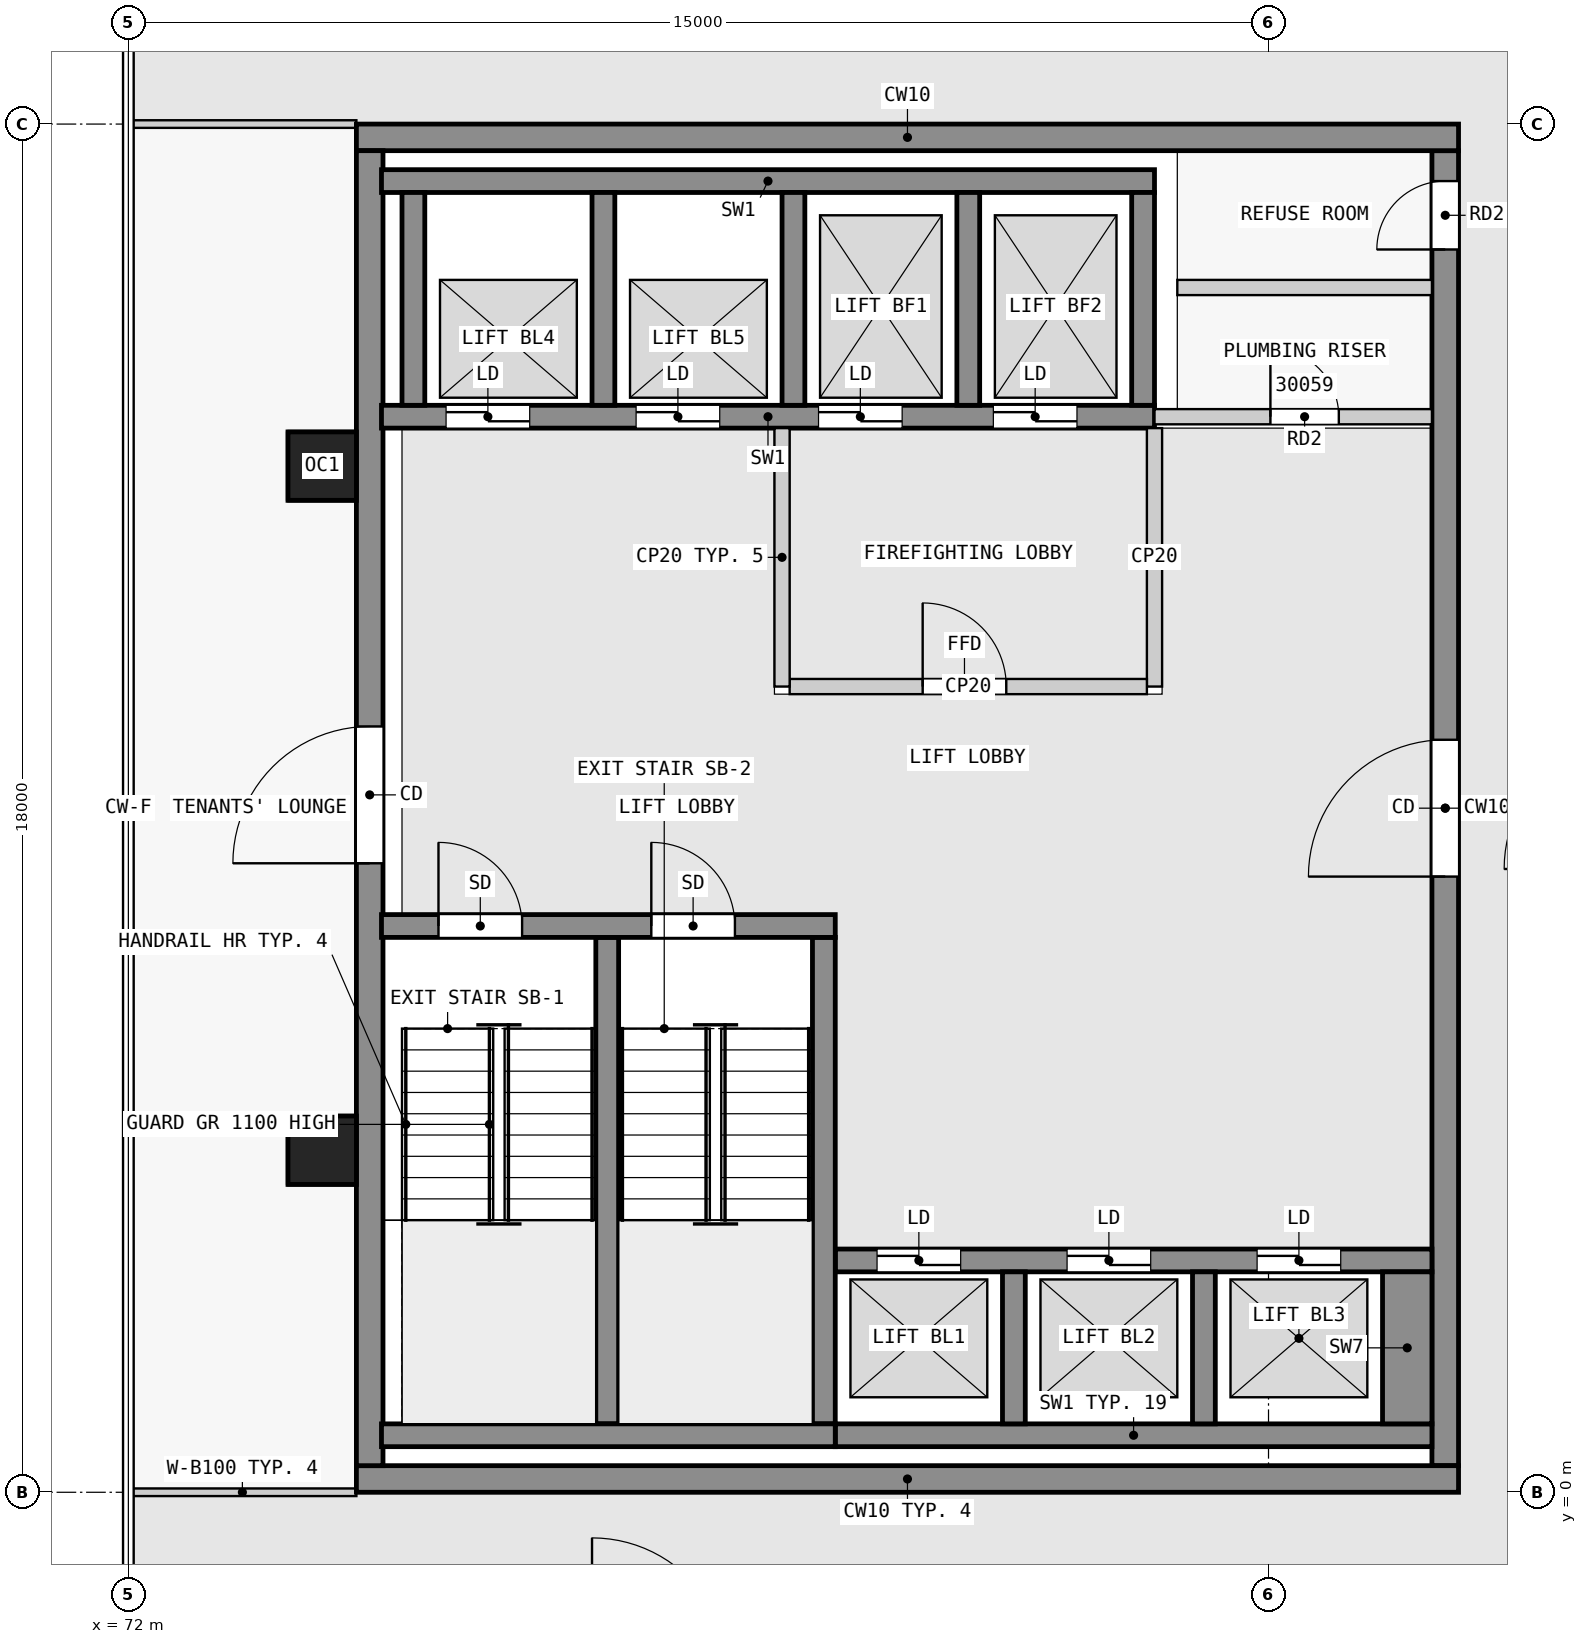
"""IFC4 building model, lengths in metres.
Left out: names, types, materials, properties, quantities, classifications, styles, units other than length and angle.
Written with IfcOpenShell. Run it as: python <this file> out.ifc"""

import sys

from ifc_helpers import new_model, si_unit, direction, frame, frame_2d, origin, origin_2d, place, context, subcontext, project, spatial, rectangle, extrude, element, fill, save


model = new_model("IFC4")
c1 = context("Model", 3, precision=1e-05, world=origin(), true_north=direction((0.0, 1.0)))
c2 = subcontext(c1, "Body", "Model", "MODEL_VIEW")
j1 = project(units=[si_unit("LENGTHUNIT", "METRE"), si_unit("PLANEANGLEUNIT", "RADIAN")], contexts=[c1])
p1 = place(None, origin())
s1 = spatial("IfcSite", under=j1, at=p1, CompositionType="ELEMENT")
p2 = place(p1, origin())
s2 = spatial("IfcBuilding", under=s1, at=p2, CompositionType="ELEMENT")
p3 = place(p2, frame((0.0, 0.0, 116.8)))
s3 = spatial("IfcBuildingStorey", under=s2, at=p3, CompositionType="ELEMENT", Elevation=116.8)
for number, where, z_axis, x_axis in (
    (1, (74.55, 13.5, 0.0), (0.0, 0.0, 1.0), (1.0, 0.0, 0.0)),
    (2, (74.55, 4.5, 0.0), (0.0, 0.0, 1.0), (1.0, 0.0, 0.0)),
):
    element("IfcColumn", number, at=place(p3, frame(where, z_axis=z_axis, x_axis=x_axis)), inside=s3, PredefinedType="COLUMN", context=c2, shape_type="SweptSolid", body=[
        extrude(rectangle(XDim=0.9, YDim=0.9, at=origin_2d()), origin(), (0.0, 0.0, 1.0), 3.5),
    ])
for number, where, z_axis, x_axis in (
    (3, (75.0, 0.175, 0.0), (0.0, 0.0, 1.0), (1.0, 0.0, 0.0)),
    (4, (75.0, 17.825, 0.0), (0.0, 0.0, 1.0), (1.0, 0.0, 0.0)),
):
    element("IfcWall", number, at=place(p3, frame(where, z_axis=z_axis, x_axis=x_axis)), inside=s3, PredefinedType="SHEAR", context=c2, shape_type="SweptSolid", body=[
        extrude(rectangle(XDim=14.5, YDim=0.35, at=frame_2d((7.25, 0.0))), origin(), (0.0, 0.0, 1.0), 3.25),
    ])
p4 = place(p3, frame((75.175, 0.35, 0.0), z_axis=(0.0, 0.0, 1.0), x_axis=(0.0, 1.0, 0.0)))
e5 = element("IfcWall", 5, at=p4, inside=s3, PredefinedType="SHEAR", context=c2, shape_type="SweptSolid", body=[
    extrude(rectangle(XDim=17.3, YDim=0.35, at=frame_2d((8.65, 0.0))), origin(), (0.0, 0.0, 1.0), 3.25),
])
p5 = place(p4, frame((7.925, 0.0, 0.0)))
e6 = element("IfcOpeningElement", 6, at=p5, cuts=e5, PredefinedType="OPENING", context=c2, shape_type="SweptSolid", body=[
    extrude(rectangle(XDim=1.8, YDim=2.1, at=frame_2d((0.9, 1.05))), frame((0.0, 0.185, 0.0), z_axis=(0.0, -1.0, 0.0), x_axis=(1.0, 0.0, 0.0)), (0.0, 0.0, 1.0), 0.37),
])
p6 = place(p3, frame((89.325, 0.35, 0.0), z_axis=(0.0, 0.0, 1.0), x_axis=(0.0, 1.0, 0.0)))
e7 = element("IfcWall", 7, at=p6, inside=s3, PredefinedType="SHEAR", context=c2, shape_type="SweptSolid", body=[
    extrude(rectangle(XDim=17.3, YDim=0.35, at=frame_2d((8.65, 0.0))), origin(), (0.0, 0.0, 1.0), 3.25),
])
p7 = place(p6, frame((7.75, 0.0, 0.0)))
e8 = element("IfcOpeningElement", 8, at=p7, cuts=e7, PredefinedType="OPENING", context=c2, shape_type="SweptSolid", body=[
    extrude(rectangle(XDim=1.8, YDim=2.1, at=frame_2d((0.9, 1.05))), frame((0.0, 0.185, 0.0), z_axis=(0.0, -1.0, 0.0), x_axis=(1.0, 0.0, 0.0)), (0.0, 0.0, 1.0), 0.37),
])
p8 = place(p6, frame((16.0, 0.0, 0.0)))
e9 = element("IfcOpeningElement", 9, at=p8, cuts=e7, PredefinedType="OPENING", context=c2, shape_type="SweptSolid", body=[
    extrude(rectangle(XDim=0.9, YDim=2.1, at=frame_2d((0.45, 1.05))), frame((0.0, 0.185, 0.0), z_axis=(0.0, -1.0, 0.0), x_axis=(1.0, 0.0, 0.0)), (0.0, 0.0, 1.0), 0.37),
])
p9 = place(p3, frame((75.33, 0.75, 0.0), z_axis=(0.0, 0.0, 1.0), x_axis=(1.0, 0.0, 0.0)))
e10 = element("IfcWall", 10, at=p9, inside=s3, PredefinedType="SHEAR", context=c2, shape_type="SweptSolid", body=[
    extrude(rectangle(XDim=5.97, YDim=0.3, at=frame_2d((2.985, 0.0))), origin(), (0.0, 0.0, 1.0), 3.25),
])
p10 = place(p3, frame((75.33, 7.45, 0.0), z_axis=(0.0, 0.0, 1.0), x_axis=(1.0, 0.0, 0.0)))
e11 = element("IfcWall", 11, at=p10, inside=s3, PredefinedType="SHEAR", context=c2, shape_type="SweptSolid", body=[
    extrude(rectangle(XDim=5.97, YDim=0.3, at=frame_2d((2.985, 0.0))), origin(), (0.0, 0.0, 1.0), 3.25),
])
p11 = place(p10, frame((0.75, 0.0, 0.0)))
e12 = element("IfcOpeningElement", 12, at=p11, cuts=e11, PredefinedType="OPENING", context=c2, shape_type="SweptSolid", body=[
    extrude(rectangle(XDim=1.1, YDim=2.1, at=frame_2d((0.55, 1.05))), frame((0.0, 0.16, 0.0), z_axis=(0.0, -1.0, 0.0), x_axis=(1.0, 0.0, 0.0)), (0.0, 0.0, 1.0), 0.32),
])
p12 = place(p10, frame((3.55, 0.0, 0.0)))
e13 = element("IfcOpeningElement", 13, at=p12, cuts=e11, PredefinedType="OPENING", context=c2, shape_type="SweptSolid", body=[
    extrude(rectangle(XDim=1.1, YDim=2.1, at=frame_2d((0.55, 1.05))), frame((0.0, 0.16, 0.0), z_axis=(0.0, -1.0, 0.0), x_axis=(1.0, 0.0, 0.0)), (0.0, 0.0, 1.0), 0.32),
])
for number, where, z_axis, x_axis in (
    (14, (78.3, 0.9, 0.0), (0.0, 0.0, 1.0), (0.0, 1.0, 0.0)),
    (15, (81.15, 0.9, 0.0), (0.0, 0.0, 1.0), (0.0, 1.0, 0.0)),
):
    element("IfcWall", number, at=place(p3, frame(where, z_axis=z_axis, x_axis=x_axis)), inside=s3, PredefinedType="SHEAR", context=c2, shape_type="SweptSolid", body=[
        extrude(rectangle(XDim=6.4, YDim=0.3, at=frame_2d((3.2, 0.0))), origin(), (0.0, 0.0, 1.0), 3.25),
    ])
p13 = place(p3, frame((81.3, 0.75, 0.0), z_axis=(0.0, 0.0, 1.0), x_axis=(1.0, 0.0, 0.0)))
e16 = element("IfcWall", 16, at=p13, inside=s3, PredefinedType="SHEAR", context=c2, shape_type="SweptSolid", body=[
    extrude(rectangle(XDim=7.85, YDim=0.3, at=frame_2d((3.925, 0.0))), origin(), (0.0, 0.0, 1.0), 3.25),
])
for number, where, z_axis, x_axis in (
    (17, (83.65, 0.9, 0.0), (0.0, 0.0, 1.0), (0.0, 1.0, 0.0)),
    (18, (86.15, 0.9, 0.0), (0.0, 0.0, 1.0), (0.0, 1.0, 0.0)),
):
    element("IfcWall", number, at=place(p3, frame(where, z_axis=z_axis, x_axis=x_axis)), inside=s3, PredefinedType="SHEAR", context=c2, shape_type="SweptSolid", body=[
        extrude(rectangle(XDim=2.0, YDim=0.3, at=frame_2d((1.0, 0.0))), origin(), (0.0, 0.0, 1.0), 3.25),
    ])
p14 = place(p3, frame((88.825, 0.9, 0.0), z_axis=(0.0, 0.0, 1.0), x_axis=(0.0, 1.0, 0.0)))
e19 = element("IfcWall", 19, at=p14, inside=s3, PredefinedType="SHEAR", context=c2, shape_type="SweptSolid", body=[
    extrude(rectangle(XDim=2.0, YDim=0.65, at=frame_2d((1.0, 0.0))), origin(), (0.0, 0.0, 1.0), 3.25),
])
p15 = place(p3, frame((81.3, 3.05, 0.0), z_axis=(0.0, 0.0, 1.0), x_axis=(1.0, 0.0, 0.0)))
e20 = element("IfcWall", 20, at=p15, inside=s3, PredefinedType="SHEAR", context=c2, shape_type="SweptSolid", body=[
    extrude(rectangle(XDim=7.85, YDim=0.3, at=frame_2d((3.925, 0.0))), origin(), (0.0, 0.0, 1.0), 3.25),
])
p16 = place(p15, frame((0.55, 0.0, 0.0)))
e21 = element("IfcOpeningElement", 21, at=p16, cuts=e20, PredefinedType="OPENING", context=c2, shape_type="SweptSolid", body=[
    extrude(rectangle(XDim=1.1, YDim=2.1, at=frame_2d((0.55, 1.05))), frame((0.0, 0.16, 0.0), z_axis=(0.0, -1.0, 0.0), x_axis=(1.0, 0.0, 0.0)), (0.0, 0.0, 1.0), 0.32),
])
p17 = place(p15, frame((3.05, 0.0, 0.0)))
e22 = element("IfcOpeningElement", 22, at=p17, cuts=e20, PredefinedType="OPENING", context=c2, shape_type="SweptSolid", body=[
    extrude(rectangle(XDim=1.1, YDim=2.1, at=frame_2d((0.55, 1.05))), frame((0.0, 0.16, 0.0), z_axis=(0.0, -1.0, 0.0), x_axis=(1.0, 0.0, 0.0)), (0.0, 0.0, 1.0), 0.32),
])
p18 = place(p15, frame((5.55, 0.0, 0.0)))
e23 = element("IfcOpeningElement", 23, at=p18, cuts=e20, PredefinedType="OPENING", context=c2, shape_type="SweptSolid", body=[
    extrude(rectangle(XDim=1.1, YDim=2.1, at=frame_2d((0.55, 1.05))), frame((0.0, 0.16, 0.0), z_axis=(0.0, -1.0, 0.0), x_axis=(1.0, 0.0, 0.0)), (0.0, 0.0, 1.0), 0.32),
])
p19 = place(p3, frame((75.33, 17.25, 0.0), z_axis=(0.0, 0.0, 1.0), x_axis=(1.0, 0.0, 0.0)))
e24 = element("IfcWall", 24, at=p19, inside=s3, PredefinedType="SHEAR", context=c2, shape_type="SweptSolid", body=[
    extrude(rectangle(XDim=10.17, YDim=0.3, at=frame_2d((5.085, 0.0))), origin(), (0.0, 0.0, 1.0), 3.25),
])
p20 = place(p3, frame((75.33, 14.15, 0.0), z_axis=(0.0, 0.0, 1.0), x_axis=(1.0, 0.0, 0.0)))
e25 = element("IfcWall", 25, at=p20, inside=s3, PredefinedType="SHEAR", context=c2, shape_type="SweptSolid", body=[
    extrude(rectangle(XDim=10.17, YDim=0.3, at=frame_2d((5.085, 0.0))), origin(), (0.0, 0.0, 1.0), 3.25),
])
p21 = place(p20, frame((0.85, 0.0, 0.0)))
e26 = element("IfcOpeningElement", 26, at=p21, cuts=e25, PredefinedType="OPENING", context=c2, shape_type="SweptSolid", body=[
    extrude(rectangle(XDim=1.1, YDim=2.1, at=frame_2d((0.55, 1.05))), frame((0.0, 0.16, 0.0), z_axis=(0.0, -1.0, 0.0), x_axis=(1.0, 0.0, 0.0)), (0.0, 0.0, 1.0), 0.32),
])
p22 = place(p20, frame((3.35, 0.0, 0.0)))
e27 = element("IfcOpeningElement", 27, at=p22, cuts=e25, PredefinedType="OPENING", context=c2, shape_type="SweptSolid", body=[
    extrude(rectangle(XDim=1.1, YDim=2.1, at=frame_2d((0.55, 1.05))), frame((0.0, 0.16, 0.0), z_axis=(0.0, -1.0, 0.0), x_axis=(1.0, 0.0, 0.0)), (0.0, 0.0, 1.0), 0.32),
])
p23 = place(p20, frame((5.75, 0.0, 0.0)))
e28 = element("IfcOpeningElement", 28, at=p23, cuts=e25, PredefinedType="OPENING", context=c2, shape_type="SweptSolid", body=[
    extrude(rectangle(XDim=1.1, YDim=2.1, at=frame_2d((0.55, 1.05))), frame((0.0, 0.16, 0.0), z_axis=(0.0, -1.0, 0.0), x_axis=(1.0, 0.0, 0.0)), (0.0, 0.0, 1.0), 0.32),
])
p24 = place(p20, frame((8.05, 0.0, 0.0)))
e29 = element("IfcOpeningElement", 29, at=p24, cuts=e25, PredefinedType="OPENING", context=c2, shape_type="SweptSolid", body=[
    extrude(rectangle(XDim=1.1, YDim=2.1, at=frame_2d((0.55, 1.05))), frame((0.0, 0.16, 0.0), z_axis=(0.0, -1.0, 0.0), x_axis=(1.0, 0.0, 0.0)), (0.0, 0.0, 1.0), 0.32),
])
for number, where, z_axis, x_axis in (
    (30, (75.75, 14.3, 0.0), (0.0, 0.0, 1.0), (0.0, 1.0, 0.0)),
    (31, (78.25, 14.3, 0.0), (0.0, 0.0, 1.0), (0.0, 1.0, 0.0)),
    (32, (80.75, 14.3, 0.0), (0.0, 0.0, 1.0), (0.0, 1.0, 0.0)),
    (33, (83.05, 14.3, 0.0), (0.0, 0.0, 1.0), (0.0, 1.0, 0.0)),
    (34, (85.35, 14.3, 0.0), (0.0, 0.0, 1.0), (0.0, 1.0, 0.0)),
):
    element("IfcWall", number, at=place(p3, frame(where, z_axis=z_axis, x_axis=x_axis)), inside=s3, PredefinedType="SHEAR", context=c2, shape_type="SweptSolid", body=[
        extrude(rectangle(XDim=2.8, YDim=0.3, at=frame_2d((1.4, 0.0))), origin(), (0.0, 0.0, 1.0), 3.25),
    ])
p25 = place(p3, frame((80.6, 10.6, 0.0), z_axis=(0.0, 0.0, 1.0), x_axis=(0.0, 1.0, 0.0)))
e35 = element("IfcWall", 35, at=p25, inside=s3, PredefinedType="PARTITIONING", context=c2, shape_type="SweptSolid", body=[
    extrude(rectangle(XDim=3.4, YDim=0.2, at=frame_2d((1.7, 0.0))), origin(), (0.0, 0.0, 1.0), 3.25),
])
p26 = place(p3, frame((80.7, 10.6, 0.0), z_axis=(0.0, 0.0, 1.0), x_axis=(1.0, 0.0, 0.0)))
e36 = element("IfcWall", 36, at=p26, inside=s3, PredefinedType="PARTITIONING", context=c2, shape_type="SweptSolid", body=[
    extrude(rectangle(XDim=4.7, YDim=0.2, at=frame_2d((2.35, 0.0))), origin(), (0.0, 0.0, 1.0), 3.25),
])
p27 = place(p26, frame((1.75, 0.0, 0.0)))
e37 = element("IfcOpeningElement", 37, at=p27, cuts=e36, PredefinedType="OPENING", context=c2, shape_type="SweptSolid", body=[
    extrude(rectangle(XDim=1.1, YDim=2.1, at=frame_2d((0.55, 1.05))), frame((0.0, 0.11, 0.0), z_axis=(0.0, -1.0, 0.0), x_axis=(1.0, 0.0, 0.0)), (0.0, 0.0, 1.0), 0.22),
])
p28 = place(p3, frame((85.5, 10.6, 0.0), z_axis=(0.0, 0.0, 1.0), x_axis=(0.0, 1.0, 0.0)))
e38 = element("IfcWall", 38, at=p28, inside=s3, PredefinedType="PARTITIONING", context=c2, shape_type="SweptSolid", body=[
    extrude(rectangle(XDim=3.4, YDim=0.2, at=frame_2d((1.7, 0.0))), origin(), (0.0, 0.0, 1.0), 3.25),
])
p29 = place(p3, frame((85.5, 14.15, 0.0), z_axis=(0.0, 0.0, 1.0), x_axis=(1.0, 0.0, 0.0)))
e39 = element("IfcWall", 39, at=p29, inside=s3, PredefinedType="PARTITIONING", context=c2, shape_type="SweptSolid", body=[
    extrude(rectangle(XDim=3.65, YDim=0.2, at=frame_2d((1.825, 0.0))), origin(), (0.0, 0.0, 1.0), 3.25),
])
p30 = place(p29, frame((1.525, 0.0, 0.0)))
e40 = element("IfcOpeningElement", 40, at=p30, cuts=e39, PredefinedType="OPENING", context=c2, shape_type="SweptSolid", body=[
    extrude(rectangle(XDim=0.9, YDim=2.1, at=frame_2d((0.45, 1.05))), frame((0.0, 0.11, 0.0), z_axis=(0.0, -1.0, 0.0), x_axis=(1.0, 0.0, 0.0)), (0.0, 0.0, 1.0), 0.22),
])
p31 = place(p3, frame((85.8, 15.85, 0.0), z_axis=(0.0, 0.0, 1.0), x_axis=(1.0, 0.0, 0.0)))
e41 = element("IfcWall", 41, at=p31, inside=s3, PredefinedType="PARTITIONING", context=c2, shape_type="SweptSolid", body=[
    extrude(rectangle(XDim=3.35, YDim=0.2, at=frame_2d((1.675, 0.0))), origin(), (0.0, 0.0, 1.0), 3.25),
])
for number, where, z_axis, x_axis in (
    (42, (72.0, 0.0, 0.0), (0.0, 0.0, 1.0), (1.0, 0.0, 0.0)),
    (43, (72.0, 18.0, 0.0), (0.0, 0.0, 1.0), (1.0, 0.0, 0.0)),
):
    element("IfcWall", number, at=place(p3, frame(where, z_axis=z_axis, x_axis=x_axis)), inside=s3, PredefinedType="PARTITIONING", context=c2, shape_type="SweptSolid", body=[
        extrude(rectangle(XDim=3.0, YDim=0.1, at=frame_2d((1.5, 0.0))), origin(), (0.0, 0.0, 1.0), 3.25),
    ])
p32 = place(p27, origin())
e44 = element("IfcDoor", 44, at=p32, inside=s3, OperationType="SINGLE_SWING_LEFT", PredefinedType="DOOR", context=c2, shape_type="SweptSolid", body=[
    extrude(rectangle(XDim=1.1, YDim=2.1, at=frame_2d((0.55, 1.05))), frame((0.0, 0.025, 0.0), z_axis=(0.0, -1.0, 0.0), x_axis=(1.0, 0.0, 0.0)), (0.0, 0.0, 1.0), 0.05),
])
fill(e37, e44)
p33 = place(p16, origin())
e45 = element("IfcDoor", 45, at=p33, inside=s3, OperationType="DOUBLE_DOOR_SLIDING", PredefinedType="DOOR", context=c2, shape_type="SweptSolid", body=[
    extrude(rectangle(XDim=1.1, YDim=2.1, at=frame_2d((0.55, 1.05))), frame((0.0, 0.025, 0.0), z_axis=(0.0, -1.0, 0.0), x_axis=(1.0, 0.0, 0.0)), (0.0, 0.0, 1.0), 0.05),
])
fill(e21, e45)
p34 = place(p17, origin())
e46 = element("IfcDoor", 46, at=p34, inside=s3, OperationType="DOUBLE_DOOR_SLIDING", PredefinedType="DOOR", context=c2, shape_type="SweptSolid", body=[
    extrude(rectangle(XDim=1.1, YDim=2.1, at=frame_2d((0.55, 1.05))), frame((0.0, 0.025, 0.0), z_axis=(0.0, -1.0, 0.0), x_axis=(1.0, 0.0, 0.0)), (0.0, 0.0, 1.0), 0.05),
])
fill(e22, e46)
p35 = place(p18, origin())
e47 = element("IfcDoor", 47, at=p35, inside=s3, OperationType="DOUBLE_DOOR_SLIDING", PredefinedType="DOOR", context=c2, shape_type="SweptSolid", body=[
    extrude(rectangle(XDim=1.1, YDim=2.1, at=frame_2d((0.55, 1.05))), frame((0.0, 0.025, 0.0), z_axis=(0.0, -1.0, 0.0), x_axis=(1.0, 0.0, 0.0)), (0.0, 0.0, 1.0), 0.05),
])
fill(e23, e47)
p36 = place(p21, origin())
e48 = element("IfcDoor", 48, at=p36, inside=s3, OperationType="DOUBLE_DOOR_SLIDING", PredefinedType="DOOR", context=c2, shape_type="SweptSolid", body=[
    extrude(rectangle(XDim=1.1, YDim=2.1, at=frame_2d((0.55, 1.05))), frame((0.0, 0.025, 0.0), z_axis=(0.0, -1.0, 0.0), x_axis=(1.0, 0.0, 0.0)), (0.0, 0.0, 1.0), 0.05),
])
fill(e26, e48)
p37 = place(p22, origin())
e49 = element("IfcDoor", 49, at=p37, inside=s3, OperationType="DOUBLE_DOOR_SLIDING", PredefinedType="DOOR", context=c2, shape_type="SweptSolid", body=[
    extrude(rectangle(XDim=1.1, YDim=2.1, at=frame_2d((0.55, 1.05))), frame((0.0, 0.025, 0.0), z_axis=(0.0, -1.0, 0.0), x_axis=(1.0, 0.0, 0.0)), (0.0, 0.0, 1.0), 0.05),
])
fill(e27, e49)
p38 = place(p23, origin())
e50 = element("IfcDoor", 50, at=p38, inside=s3, OperationType="DOUBLE_DOOR_SLIDING", PredefinedType="DOOR", context=c2, shape_type="SweptSolid", body=[
    extrude(rectangle(XDim=1.1, YDim=2.1, at=frame_2d((0.55, 1.05))), frame((0.0, 0.025, 0.0), z_axis=(0.0, -1.0, 0.0), x_axis=(1.0, 0.0, 0.0)), (0.0, 0.0, 1.0), 0.05),
])
fill(e28, e50)
p39 = place(p24, origin())
e51 = element("IfcDoor", 51, at=p39, inside=s3, OperationType="DOUBLE_DOOR_SLIDING", PredefinedType="DOOR", context=c2, shape_type="SweptSolid", body=[
    extrude(rectangle(XDim=1.1, YDim=2.1, at=frame_2d((0.55, 1.05))), frame((0.0, 0.025, 0.0), z_axis=(0.0, -1.0, 0.0), x_axis=(1.0, 0.0, 0.0)), (0.0, 0.0, 1.0), 0.05),
])
fill(e29, e51)
p40 = place(p11, origin())
e52 = element("IfcDoor", 52, at=p40, inside=s3, OperationType="SINGLE_SWING_RIGHT", PredefinedType="DOOR", context=c2, shape_type="SweptSolid", body=[
    extrude(rectangle(XDim=1.1, YDim=2.1, at=frame_2d((0.55, 1.05))), frame((0.0, 0.025, 0.0), z_axis=(0.0, -1.0, 0.0), x_axis=(1.0, 0.0, 0.0)), (0.0, 0.0, 1.0), 0.05),
])
fill(e12, e52)
p41 = place(p12, origin())
e53 = element("IfcDoor", 53, at=p41, inside=s3, OperationType="SINGLE_SWING_LEFT", PredefinedType="DOOR", context=c2, shape_type="SweptSolid", body=[
    extrude(rectangle(XDim=1.1, YDim=2.1, at=frame_2d((0.55, 1.05))), frame((0.0, 0.025, 0.0), z_axis=(0.0, -1.0, 0.0), x_axis=(1.0, 0.0, 0.0)), (0.0, 0.0, 1.0), 0.05),
])
fill(e13, e53)
p42 = place(p5, origin())
e54 = element("IfcDoor", 54, at=p42, inside=s3, OperationType="DOUBLE_DOOR_SINGLE_SWING", PredefinedType="DOOR", context=c2, shape_type="SweptSolid", body=[
    extrude(rectangle(XDim=1.8, YDim=2.1, at=frame_2d((0.9, 1.05))), frame((0.0, 0.025, 0.0), z_axis=(0.0, -1.0, 0.0), x_axis=(1.0, 0.0, 0.0)), (0.0, 0.0, 1.0), 0.05),
])
fill(e6, e54)
p43 = place(p7, origin())
e55 = element("IfcDoor", 55, at=p43, inside=s3, OperationType="DOUBLE_DOOR_SINGLE_SWING", PredefinedType="DOOR", context=c2, shape_type="SweptSolid", body=[
    extrude(rectangle(XDim=1.8, YDim=2.1, at=frame_2d((0.9, 1.05))), frame((0.0, 0.025, 0.0), z_axis=(0.0, -1.0, 0.0), x_axis=(1.0, 0.0, 0.0)), (0.0, 0.0, 1.0), 0.05),
])
fill(e8, e55)
p44 = place(p30, origin())
e56 = element("IfcDoor", 56, at=p44, inside=s3, OperationType="SINGLE_SWING_LEFT", PredefinedType="DOOR", context=c2, shape_type="SweptSolid", body=[
    extrude(rectangle(XDim=0.9, YDim=2.1, at=frame_2d((0.45, 1.05))), frame((0.0, 0.025, 0.0), z_axis=(0.0, -1.0, 0.0), x_axis=(1.0, 0.0, 0.0)), (0.0, 0.0, 1.0), 0.05),
])
fill(e40, e56)
p45 = place(p8, origin())
e57 = element("IfcDoor", 57, at=p45, inside=s3, OperationType="SINGLE_SWING_LEFT", PredefinedType="DOOR", context=c2, shape_type="SweptSolid", body=[
    extrude(rectangle(XDim=0.9, YDim=2.1, at=frame_2d((0.45, 1.05))), frame((0.0, 0.025, 0.0), z_axis=(0.0, -1.0, 0.0), x_axis=(1.0, 0.0, 0.0)), (0.0, 0.0, 1.0), 0.05),
])
fill(e9, e57)
save(model, sys.argv[1])
